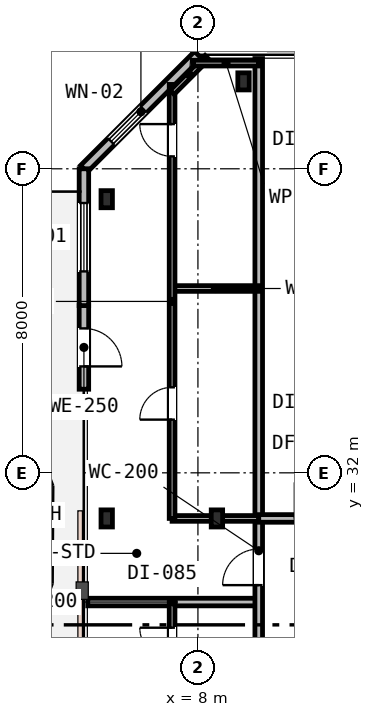
"""IFC4 building model, lengths in metres.
Left out: names, types, materials, properties, quantities, classifications, styles, units other than length and angle.
Written with IfcOpenShell. Run it as: python <this file> out.ifc"""

import sys

from ifc_helpers import new_model, si_unit, direction, frame, frame_2d, origin, origin_2d, place, context, subcontext, project, spatial, rectangle, i_section, extrude, element, fill, save


model = new_model("IFC4")
c1 = context("Model", 3, precision=1e-05, world=origin(), true_north=direction((0.0, 1.0)))
c2 = subcontext(c1, "Body", "Model", "MODEL_VIEW")
j1 = project(units=[si_unit("LENGTHUNIT", "METRE"), si_unit("PLANEANGLEUNIT", "RADIAN")], contexts=[c1])
p1 = place(None, origin())
s1 = spatial("IfcSite", under=j1, at=p1, CompositionType="ELEMENT")
p2 = place(p1, origin())
s2 = spatial("IfcBuilding", under=s1, at=p2, CompositionType="ELEMENT")
p3 = place(p2, frame((0.0, 0.0, 245.0)))
s3 = spatial("IfcBuildingStorey", under=s2, at=p3, CompositionType="ELEMENT", Elevation=245.0)
for number, where, z_axis, x_axis in (
    (1, (5.6, 30.8, 0.0), (0.0, 0.0, 1.0), (1.0, 0.0, 0.0)),
    (2, (5.6, 39.2, 0.0), (0.0, 0.0, 1.0), (1.0, 0.0, 0.0)),
    (3, (8.5, 30.8, 0.0), (0.0, 0.0, 1.0), (1.0, 0.0, 0.0)),
    (4, (9.2, 42.3, 0.0), (0.0, 0.0, 1.0), (1.0, 0.0, 0.0)),
):
    element("IfcColumn", number, at=place(p3, frame(where, z_axis=z_axis, x_axis=x_axis)), inside=s3, PredefinedType="COLUMN", context=c2, shape_type="SweptSolid", body=[
        extrude(i_section(OverallWidth=0.3, OverallDepth=0.45, WebThickness=0.014, FlangeThickness=0.026, FilletRadius=0.027, at=origin_2d()), origin(), (0.0, 0.0, 1.0), 3.8),
    ])
p4 = place(p3, frame((8.0, 43.0, 0.0), z_axis=(0.0, 0.0, 1.0), x_axis=(-0.707106781187, -0.707106781187, 0.0)))
e5 = element("IfcWall", 5, at=p4, inside=s3, PredefinedType="STANDARD", context=c2, shape_type="SweptSolid", body=[
    extrude(rectangle(XDim=4.243, YDim=0.25, at=frame_2d((2.121, 0.0))), origin(), (0.0, 0.0, 1.0), 3.53),
])
p5 = place(p4, frame((2.027, 0.0, 0.85)))
e6 = element("IfcOpeningElement", 6, at=p5, cuts=e5, PredefinedType="OPENING", context=c2, shape_type="SweptSolid", body=[
    extrude(rectangle(XDim=1.2, YDim=1.6, at=frame_2d((0.6, 0.8))), frame((0.0, 0.135, 0.0), z_axis=(0.0, -1.0, 0.0), x_axis=(1.0, 0.0, 0.0)), (0.0, 0.0, 1.0), 0.27),
])
p6 = place(p3, frame((5.0, 36.4, 0.0), z_axis=(0.0, 0.0, 1.0), x_axis=(0.0, -1.0, 0.0)))
e7 = element("IfcWall", 7, at=p6, inside=s3, PredefinedType="STANDARD", context=c2, shape_type="SweptSolid", body=[
    extrude(rectangle(XDim=2.2, YDim=0.25, at=frame_2d((1.1, 0.0))), origin(), (0.0, 0.0, 1.0), 3.53),
])
p7 = place(p6, frame((0.6, 0.0, 0.0)))
e8 = element("IfcOpeningElement", 8, at=p7, cuts=e7, PredefinedType="OPENING", context=c2, shape_type="SweptSolid", body=[
    extrude(rectangle(XDim=1.0, YDim=2.15, at=frame_2d((0.5, 1.075))), frame((0.0, 0.135, 0.0), z_axis=(0.0, -1.0, 0.0), x_axis=(1.0, 0.0, 0.0)), (0.0, 0.0, 1.0), 0.27),
])
p8 = place(p3, frame((5.0, 40.0, 0.0), z_axis=(0.0, 0.0, 1.0), x_axis=(0.0, -1.0, 0.0)))
e9 = element("IfcWall", 9, at=p8, inside=s3, PredefinedType="STANDARD", context=c2, shape_type="SweptSolid", body=[
    extrude(rectangle(XDim=3.6, YDim=0.25, at=frame_2d((1.8, 0.0))), origin(), (0.0, 0.0, 1.0), 3.53),
])
p9 = place(p8, frame((0.9, 0.0, 0.75)))
e10 = element("IfcOpeningElement", 10, at=p9, cuts=e9, PredefinedType="OPENING", context=c2, shape_type="SweptSolid", body=[
    extrude(rectangle(XDim=1.8, YDim=1.85, at=frame_2d((0.9, 0.925))), frame((0.0, 0.135, 0.0), z_axis=(0.0, -1.0, 0.0), x_axis=(1.0, 0.0, 0.0)), (0.0, 0.0, 1.0), 0.27),
])
p10 = place(p3, frame((5.1, 28.6, 0.0), z_axis=(0.0, 0.0, 1.0), x_axis=(1.0, 0.0, 0.0)))
e11 = element("IfcWall", 11, at=p10, inside=s3, PredefinedType="PARTITIONING", context=c2, shape_type="SweptSolid", body=[
    extrude(rectangle(XDim=4.5, YDim=0.2, at=frame_2d((2.25, 0.0))), origin(), (0.0, 0.0, 1.0), 3.16),
])
p11 = place(p3, frame((9.6, 17.0, 0.0), z_axis=(0.0, 0.0, 1.0), x_axis=(0.0, 1.0, 0.0)))
e12 = element("IfcWall", 12, at=p11, inside=s3, PredefinedType="PARTITIONING", context=c2, shape_type="SweptSolid", body=[
    extrude(rectangle(XDim=25.9, YDim=0.2, at=frame_2d((12.95, 0.0))), origin(), (0.0, 0.0, 1.0), 3.16),
])
p12 = place(p11, frame((12.045, 0.0, 0.0)))
e13 = element("IfcOpeningElement", 13, at=p12, cuts=e12, PredefinedType="OPENING", context=c2, shape_type="SweptSolid", body=[
    extrude(rectangle(XDim=0.95, YDim=2.15, at=frame_2d((0.475, 1.075))), frame((0.0, 0.11, 0.0), z_axis=(0.0, -1.0, 0.0), x_axis=(1.0, 0.0, 0.0)), (0.0, 0.0, 1.0), 0.22),
])
p13 = place(p11, frame((3.125, 0.0, 0.0)))
e14 = element("IfcOpeningElement", 14, at=p13, cuts=e12, PredefinedType="OPENING", context=c2, shape_type="SweptSolid", body=[
    extrude(rectangle(XDim=0.95, YDim=2.15, at=frame_2d((0.475, 1.075))), frame((0.0, 0.11, 0.0), z_axis=(0.0, -1.0, 0.0), x_axis=(1.0, 0.0, 0.0)), (0.0, 0.0, 1.0), 0.22),
])
p14 = place(p3, frame((7.32, 30.8, 0.0), z_axis=(0.0, 0.0, 1.0), x_axis=(1.0, 0.0, 0.0)))
e15 = element("IfcWall", 15, at=p14, inside=s3, PredefinedType="PARTITIONING", context=c2, shape_type="SweptSolid", body=[
    extrude(rectangle(XDim=2.28, YDim=0.15, at=frame_2d((1.14, 0.0))), origin(), (0.0, 0.0, 1.0), 3.16),
])
p15 = place(p3, frame((7.32, 36.85, 0.0), z_axis=(0.0, 0.0, 1.0), x_axis=(1.0, 0.0, 0.0)))
e16 = element("IfcWall", 16, at=p15, inside=s3, PredefinedType="PARTITIONING", context=c2, shape_type="SweptSolid", body=[
    extrude(rectangle(XDim=2.28, YDim=0.15, at=frame_2d((1.14, 0.0))), origin(), (0.0, 0.0, 1.0), 3.53),
])
p16 = place(p3, frame((7.32, 30.8, 0.0), z_axis=(0.0, 0.0, 1.0), x_axis=(0.0, 1.0, 0.0)))
e17 = element("IfcWall", 17, at=p16, inside=s3, PredefinedType="PARTITIONING", context=c2, shape_type="SweptSolid", body=[
    extrude(rectangle(XDim=11.42, YDim=0.15, at=frame_2d((5.71, 0.0))), origin(), (0.0, 0.0, 1.0), 3.16),
])
p17 = place(p16, frame((2.6, 0.0, 0.0)))
e18 = element("IfcOpeningElement", 18, at=p17, cuts=e17, PredefinedType="OPENING", context=c2, shape_type="SweptSolid", body=[
    extrude(rectangle(XDim=0.85, YDim=2.15, at=frame_2d((0.425, 1.075))), frame((0.0, 0.085, 0.0), z_axis=(0.0, -1.0, 0.0), x_axis=(1.0, 0.0, 0.0)), (0.0, 0.0, 1.0), 0.17),
])
p18 = place(p16, frame((9.526, 0.0, 0.0)))
e19 = element("IfcOpeningElement", 19, at=p18, cuts=e17, PredefinedType="OPENING", context=c2, shape_type="SweptSolid", body=[
    extrude(rectangle(XDim=0.85, YDim=2.15, at=frame_2d((0.425, 1.075))), frame((0.0, 0.085, 0.0), z_axis=(0.0, -1.0, 0.0), x_axis=(1.0, 0.0, 0.0)), (0.0, 0.0, 1.0), 0.17),
])
p19 = place(p3, frame((7.32, 42.009, 0.0), z_axis=(0.0, 0.0, 1.0), x_axis=(0.707106781187, 0.707106781187, 0.0)))
e20 = element("IfcWall", 20, at=p19, inside=s3, PredefinedType="PARTITIONING", context=c2, shape_type="SweptSolid", body=[
    extrude(rectangle(XDim=1.302, YDim=0.15, at=frame_2d((0.651, 0.0))), origin(), (0.0, 0.0, 1.0), 3.53),
])
p20 = place(p3, frame((7.88, 42.78, 0.0), z_axis=(0.0, 0.0, 1.0), x_axis=(1.0, 0.0, 0.0)))
e21 = element("IfcWall", 21, at=p20, inside=s3, PredefinedType="PARTITIONING", context=c2, shape_type="SweptSolid", body=[
    extrude(rectangle(XDim=1.72, YDim=0.15, at=frame_2d((0.86, 0.0))), origin(), (0.0, 0.0, 1.0), 3.27),
])
p21 = place(p3, frame((9.6, 30.8, 0.0), z_axis=(0.0, 0.0, 1.0), x_axis=(1.0, 0.0, 0.0)))
e22 = element("IfcWall", 22, at=p21, inside=s3, PredefinedType="PARTITIONING", context=c2, shape_type="SweptSolid", body=[
    extrude(rectangle(XDim=6.3, YDim=0.2, at=frame_2d((3.15, 0.0))), origin(), (0.0, 0.0, 1.0), 3.16),
])
p22 = place(p21, frame((0.95, 0.0, 0.0)))
e23 = element("IfcOpeningElement", 23, at=p22, cuts=e22, PredefinedType="OPENING", context=c2, shape_type="SweptSolid", body=[
    extrude(rectangle(XDim=0.95, YDim=2.15, at=frame_2d((0.475, 1.075))), frame((0.0, 0.11, 0.0), z_axis=(0.0, -1.0, 0.0), x_axis=(1.0, 0.0, 0.0)), (0.0, 0.0, 1.0), 0.22),
])
p23 = place(p21, frame((4.1, 0.0, 0.0)))
e24 = element("IfcOpeningElement", 24, at=p23, cuts=e22, PredefinedType="OPENING", context=c2, shape_type="SweptSolid", body=[
    extrude(rectangle(XDim=0.95, YDim=2.15, at=frame_2d((0.475, 1.075))), frame((0.0, 0.11, 0.0), z_axis=(0.0, -1.0, 0.0), x_axis=(1.0, 0.0, 0.0)), (0.0, 0.0, 1.0), 0.22),
])
p24 = place(p3, frame((7.32, 24.2, 0.0), z_axis=(0.0, 0.0, 1.0), x_axis=(0.0, 1.0, 0.0)))
e25 = element("IfcWall", 25, at=p24, inside=s3, PredefinedType="PARTITIONING", context=c2, shape_type="SweptSolid", body=[
    extrude(rectangle(XDim=4.4, YDim=0.15, at=frame_2d((2.2, 0.0))), origin(), (0.0, 0.0, 1.0), 3.16),
])
p25 = place(p24, frame((0.873, 0.0, 0.0)))
e26 = element("IfcOpeningElement", 26, at=p25, cuts=e25, PredefinedType="OPENING", context=c2, shape_type="SweptSolid", body=[
    extrude(rectangle(XDim=0.85, YDim=2.15, at=frame_2d((0.425, 1.075))), frame((0.0, 0.085, 0.0), z_axis=(0.0, -1.0, 0.0), x_axis=(1.0, 0.0, 0.0)), (0.0, 0.0, 1.0), 0.17),
])
p26 = place(p24, frame((2.875, 0.0, 0.0)))
e27 = element("IfcOpeningElement", 27, at=p26, cuts=e25, PredefinedType="OPENING", context=c2, shape_type="SweptSolid", body=[
    extrude(rectangle(XDim=0.85, YDim=2.15, at=frame_2d((0.425, 1.075))), frame((0.0, 0.085, 0.0), z_axis=(0.0, -1.0, 0.0), x_axis=(1.0, 0.0, 0.0)), (0.0, 0.0, 1.0), 0.17),
])
p27 = place(p5, origin())
e28 = element("IfcWindow", 28, at=p27, inside=s3, PartitioningType="SINGLE_PANEL", PredefinedType="WINDOW", context=c2, shape_type="SweptSolid", body=[
    extrude(rectangle(XDim=1.2, YDim=1.6, at=frame_2d((0.6, 0.8))), frame((0.0, 0.03, 0.0), z_axis=(0.0, -1.0, 0.0), x_axis=(1.0, 0.0, 0.0)), (0.0, 0.0, 1.0), 0.06),
])
fill(e6, e28)
p28 = place(p7, origin())
e29 = element("IfcDoor", 29, at=p28, inside=s3, OperationType="SINGLE_SWING_RIGHT", PredefinedType="DOOR", context=c2, shape_type="SweptSolid", body=[
    extrude(rectangle(XDim=1.0, YDim=2.15, at=frame_2d((0.5, 1.075))), frame((0.0, 0.025, 0.0), z_axis=(0.0, -1.0, 0.0), x_axis=(1.0, 0.0, 0.0)), (0.0, 0.0, 1.0), 0.05),
])
fill(e8, e29)
p29 = place(p9, origin())
e30 = element("IfcWindow", 30, at=p29, inside=s3, PartitioningType="SINGLE_PANEL", PredefinedType="WINDOW", context=c2, shape_type="SweptSolid", body=[
    extrude(rectangle(XDim=1.8, YDim=1.85, at=frame_2d((0.9, 0.925))), frame((0.0, 0.03, 0.0), z_axis=(0.0, -1.0, 0.0), x_axis=(1.0, 0.0, 0.0)), (0.0, 0.0, 1.0), 0.06),
])
fill(e10, e30)
p30 = place(p12, origin())
e31 = element("IfcDoor", 31, at=p30, inside=s3, OperationType="SINGLE_SWING_LEFT", PredefinedType="DOOR", context=c2, shape_type="SweptSolid", body=[
    extrude(rectangle(XDim=0.95, YDim=2.15, at=frame_2d((0.475, 1.075))), frame((0.0, 0.025, 0.0), z_axis=(0.0, -1.0, 0.0), x_axis=(1.0, 0.0, 0.0)), (0.0, 0.0, 1.0), 0.05),
])
fill(e13, e31)
p31 = place(p17, origin())
e32 = element("IfcDoor", 32, at=p31, inside=s3, OperationType="SINGLE_SWING_LEFT", PredefinedType="DOOR", context=c2, shape_type="SweptSolid", body=[
    extrude(rectangle(XDim=0.85, YDim=2.15, at=frame_2d((0.425, 1.075))), frame((0.0, 0.025, 0.0), z_axis=(0.0, -1.0, 0.0), x_axis=(1.0, 0.0, 0.0)), (0.0, 0.0, 1.0), 0.05),
])
fill(e18, e32)
p32 = place(p18, origin())
e33 = element("IfcDoor", 33, at=p32, inside=s3, OperationType="SINGLE_SWING_RIGHT", PredefinedType="DOOR", context=c2, shape_type="SweptSolid", body=[
    extrude(rectangle(XDim=0.85, YDim=2.15, at=frame_2d((0.425, 1.075))), frame((0.0, 0.025, 0.0), z_axis=(0.0, -1.0, 0.0), x_axis=(1.0, 0.0, 0.0)), (0.0, 0.0, 1.0), 0.05),
])
fill(e19, e33)
p33 = place(p26, origin())
e34 = element("IfcDoor", 34, at=p33, inside=s3, OperationType="SINGLE_SWING_RIGHT", PredefinedType="DOOR", context=c2, shape_type="SweptSolid", body=[
    extrude(rectangle(XDim=0.85, YDim=2.15, at=frame_2d((0.425, 1.075))), frame((0.0, 0.025, 0.0), z_axis=(0.0, -1.0, 0.0), x_axis=(1.0, 0.0, 0.0)), (0.0, 0.0, 1.0), 0.05),
])
fill(e27, e34)
save(model, sys.argv[1])
